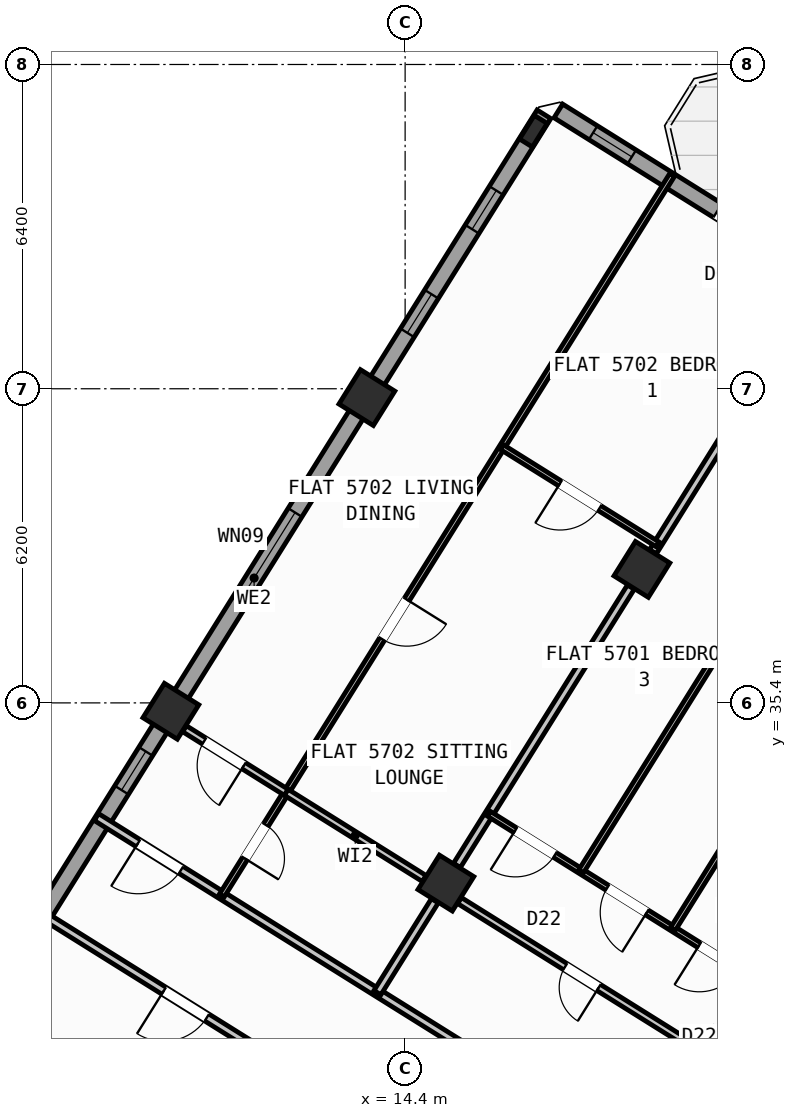
"""IFC4 building model, lengths in metres.
Left out: names, types, materials, properties, quantities, classifications, styles, units other than length and angle.
Written with IfcOpenShell. Run it as: python <this file> out.ifc"""

import sys

from ifc_helpers import new_model, si_unit, direction, frame, frame_2d, origin, origin_2d, place, context, subcontext, project, spatial, rectangle, hollow_rectangle, i_section, extrude, source, transform, mapped, element, fill, save


model = new_model("IFC4")
c1 = context("Model", 3, precision=1e-05, world=origin(), true_north=direction((0.0, 1.0)))
c2 = subcontext(c1, "Body", "Model", "MODEL_VIEW")
j1 = project(units=[si_unit("LENGTHUNIT", "METRE"), si_unit("PLANEANGLEUNIT", "RADIAN")], contexts=[c1])
p1 = place(None, origin())
s1 = spatial("IfcSite", under=j1, at=p1, CompositionType="ELEMENT")
p2 = place(p1, origin())
s2 = spatial("IfcBuilding", under=s1, at=p2, CompositionType="ELEMENT")
p3 = place(p2, frame((0.0, 0.0, 225.6)))
s3 = spatial("IfcBuildingStorey", under=s2, at=p3, CompositionType="ELEMENT", Elevation=225.6)
m1 = source(origin(), c2, "Body", "SweptSolid", [
    extrude(hollow_rectangle(XDim=0.8, YDim=0.8, WallThickness=0.032, at=origin_2d()), origin(), (0.0, 0.0, 1.0), 3.6),
])
for number, where, z_axis, x_axis in (
    (1, (20.632, 28.452, 0.0), (0.0, 0.0, 1.0), (-0.848, 0.53, 0.0)),
    (2, (19.073, 38.034, 0.0), (0.0, 0.0, 1.0), (-0.848, 0.53, 0.0)),
    (3, (15.205, 31.844, 0.0), (0.0, 0.0, 1.0), (-0.848, 0.53, 0.0)),
):
    element("IfcColumn", number, at=place(p3, frame(where, z_axis=z_axis, x_axis=x_axis)), inside=s3, PredefinedType="COLUMN", context=c2, shape_type="MappedRepresentation", body=[
        mapped(m1, transform((0.0, 0.0, 0.0), scale=1.0)),
    ])
m2 = source(origin(), c2, "Body", "SweptSolid", [
    extrude(i_section(OverallWidth=0.3, OverallDepth=0.55, WebThickness=0.015, FlangeThickness=0.029, at=origin_2d()), origin(), (0.0, 0.0, 1.0), 3.6),
])
p4 = place(p3, frame((16.931, 46.684, 0.0), z_axis=(0.0, 0.0, 1.0), x_axis=(-0.848048096156, 0.529919264233, 0.0)))
e4 = element("IfcColumn", 4, at=p4, inside=s3, PredefinedType="COLUMN", context=c2, shape_type="MappedRepresentation", body=[
    mapped(m2, transform((0.0, 0.0, 0.0), scale=1.0)),
])
for number, where, z_axis, x_axis in (
    (5, (13.646, 41.426, 0.0), (0.0, 0.0, 1.0), (-0.848, 0.53, 0.0)),
    (6, (9.777, 35.235, 0.0), (0.0, 0.0, 1.0), (-0.848, 0.53, 0.0)),
):
    element("IfcColumn", number, at=place(p3, frame(where, z_axis=z_axis, x_axis=x_axis)), inside=s3, PredefinedType="COLUMN", context=c2, shape_type="MappedRepresentation", body=[
        mapped(m1, transform((0.0, 0.0, 0.0), scale=1.0)),
    ])
p5 = place(p3, frame((5.7, 28.71, 0.0), z_axis=(0.0, 0.0, 1.0), x_axis=(0.529923711467, 0.8480453172, 0.0)))
e7 = element("IfcWall", 7, at=p5, inside=s3, PredefinedType="STANDARD", context=c2, shape_type="SweptSolid", body=[
    extrude(rectangle(XDim=21.587, YDim=0.32, at=frame_2d((10.794, 0.0))), origin(), (0.0, 0.0, 1.0), 2.825),
])
p6 = place(p5, frame((1.329, 0.0, 1.0)))
e8 = element("IfcOpeningElement", 8, at=p6, cuts=e7, PredefinedType="OPENING", context=c2, shape_type="SweptSolid", body=[
    extrude(rectangle(XDim=0.9, YDim=1.25, at=frame_2d((0.45, 0.625))), frame((0.0, 0.17, 0.0), z_axis=(0.0, -1.0, 0.0), x_axis=(1.0, 0.0, 0.0)), (0.0, 0.0, 1.0), 0.34),
])
p7 = place(p5, frame((5.859, 0.0, 1.0)))
e9 = element("IfcOpeningElement", 9, at=p7, cuts=e7, PredefinedType="OPENING", context=c2, shape_type="SweptSolid", body=[
    extrude(rectangle(XDim=0.9, YDim=1.25, at=frame_2d((0.45, 0.625))), frame((0.0, 0.17, 0.0), z_axis=(0.0, -1.0, 0.0), x_axis=(1.0, 0.0, 0.0)), (0.0, 0.0, 1.0), 0.34),
])
p8 = place(p5, frame((10.369, 0.0, 0.95)))
e10 = element("IfcOpeningElement", 10, at=p8, cuts=e7, PredefinedType="OPENING", context=c2, shape_type="SweptSolid", body=[
    extrude(rectangle(XDim=1.95, YDim=1.35, at=frame_2d((0.975, 0.675))), frame((0.0, 0.17, 0.0), z_axis=(0.0, -1.0, 0.0), x_axis=(1.0, 0.0, 0.0)), (0.0, 0.0, 1.0), 0.34),
])
p9 = place(p5, frame((16.5, 0.0, 1.0)))
e11 = element("IfcOpeningElement", 11, at=p9, cuts=e7, PredefinedType="OPENING", context=c2, shape_type="SweptSolid", body=[
    extrude(rectangle(XDim=0.9, YDim=1.25, at=frame_2d((0.45, 0.625))), frame((0.0, 0.17, 0.0), z_axis=(0.0, -1.0, 0.0), x_axis=(1.0, 0.0, 0.0)), (0.0, 0.0, 1.0), 0.34),
])
p10 = place(p5, frame((18.913, 0.0, 1.0)))
e12 = element("IfcOpeningElement", 12, at=p10, cuts=e7, PredefinedType="OPENING", context=c2, shape_type="SweptSolid", body=[
    extrude(rectangle(XDim=0.9, YDim=1.25, at=frame_2d((0.45, 0.625))), frame((0.0, 0.17, 0.0), z_axis=(0.0, -1.0, 0.0), x_axis=(1.0, 0.0, 0.0)), (0.0, 0.0, 1.0), 0.34),
])
p11 = place(p3, frame((17.424, 47.083, 0.0), z_axis=(0.0, 0.0, 1.0), x_axis=(0.848049927979, -0.529916332693, 0.0)))
e13 = element("IfcWall", 13, at=p11, inside=s3, PredefinedType="STANDARD", context=c2, shape_type="SweptSolid", body=[
    extrude(rectangle(XDim=29.223, YDim=0.32, at=frame_2d((14.612, 0.0))), origin(), (0.0, 0.0, 1.0), 3.35),
])
p12 = place(p11, frame((3.709, 0.0, 0.0)))
e14 = element("IfcOpeningElement", 14, at=p12, cuts=e13, PredefinedType="OPENING", context=c2, shape_type="SweptSolid", body=[
    extrude(rectangle(XDim=1.05, YDim=2.15, at=frame_2d((0.525, 1.075))), frame((0.0, 0.17, 0.0), z_axis=(0.0, -1.0, 0.0), x_axis=(1.0, 0.0, 0.0)), (0.0, 0.0, 1.0), 0.34),
])
p13 = place(p11, frame((0.809, 0.0, 1.0)))
e15 = element("IfcOpeningElement", 15, at=p13, cuts=e13, PredefinedType="OPENING", context=c2, shape_type="SweptSolid", body=[
    extrude(rectangle(XDim=0.9, YDim=1.25, at=frame_2d((0.45, 0.625))), frame((0.0, 0.17, 0.0), z_axis=(0.0, -1.0, 0.0), x_axis=(1.0, 0.0, 0.0)), (0.0, 0.0, 1.0), 0.34),
])
p14 = place(p11, frame((13.811, 0.0, 0.9)))
e16 = element("IfcOpeningElement", 16, at=p14, cuts=e13, PredefinedType="OPENING", context=c2, shape_type="SweptSolid", body=[
    extrude(rectangle(XDim=1.35, YDim=1.45, at=frame_2d((0.675, 0.725))), frame((0.0, 0.17, 0.0), z_axis=(0.0, -1.0, 0.0), x_axis=(1.0, 0.0, 0.0)), (0.0, 0.0, 1.0), 0.34),
])
p15 = place(p11, frame((17.254, 0.0, 1.0)))
e17 = element("IfcOpeningElement", 17, at=p15, cuts=e13, PredefinedType="OPENING", context=c2, shape_type="SweptSolid", body=[
    extrude(rectangle(XDim=0.9, YDim=1.25, at=frame_2d((0.45, 0.625))), frame((0.0, 0.17, 0.0), z_axis=(0.0, -1.0, 0.0), x_axis=(1.0, 0.0, 0.0)), (0.0, 0.0, 1.0), 0.34),
])
p16 = place(p11, frame((21.364, 0.0, 1.0)))
e18 = element("IfcOpeningElement", 18, at=p16, cuts=e13, PredefinedType="OPENING", context=c2, shape_type="SweptSolid", body=[
    extrude(rectangle(XDim=0.9, YDim=1.25, at=frame_2d((0.45, 0.625))), frame((0.0, 0.17, 0.0), z_axis=(0.0, -1.0, 0.0), x_axis=(1.0, 0.0, 0.0)), (0.0, 0.0, 1.0), 0.34),
])
p17 = place(p11, frame((26.003, 0.0, 1.0)))
e19 = element("IfcOpeningElement", 19, at=p17, cuts=e13, PredefinedType="OPENING", context=c2, shape_type="SweptSolid", body=[
    extrude(rectangle(XDim=0.9, YDim=1.25, at=frame_2d((0.45, 0.625))), frame((0.0, 0.17, 0.0), z_axis=(0.0, -1.0, 0.0), x_axis=(1.0, 0.0, 0.0)), (0.0, 0.0, 1.0), 0.34),
])
p18 = place(p11, frame((11.211, 0.0, 1.0)))
e20 = element("IfcOpeningElement", 20, at=p18, cuts=e13, PredefinedType="OPENING", context=c2, shape_type="SweptSolid", body=[
    extrude(rectangle(XDim=0.65, YDim=1.15, at=frame_2d((0.325, 0.575))), frame((0.0, 0.17, 0.0), z_axis=(0.0, -1.0, 0.0), x_axis=(1.0, 0.0, 0.0)), (0.0, 0.0, 1.0), 0.34),
])
p19 = place(p11, frame((9.079, 0.0, 1.0)))
e21 = element("IfcOpeningElement", 21, at=p19, cuts=e13, PredefinedType="OPENING", context=c2, shape_type="SweptSolid", body=[
    extrude(rectangle(XDim=0.65, YDim=1.15, at=frame_2d((0.325, 0.575))), frame((0.0, 0.17, 0.0), z_axis=(0.0, -1.0, 0.0), x_axis=(1.0, 0.0, 0.0)), (0.0, 0.0, 1.0), 0.34),
])
p20 = place(p11, frame((6.951, 0.0, 1.0)))
e22 = element("IfcOpeningElement", 22, at=p20, cuts=e13, PredefinedType="OPENING", context=c2, shape_type="SweptSolid", body=[
    extrude(rectangle(XDim=0.65, YDim=1.15, at=frame_2d((0.325, 0.575))), frame((0.0, 0.17, 0.0), z_axis=(0.0, -1.0, 0.0), x_axis=(1.0, 0.0, 0.0)), (0.0, 0.0, 1.0), 0.34),
])
p21 = place(p3, frame((22.495, 24.281, 0.0), z_axis=(0.0, 0.0, 1.0), x_axis=(-0.848052408131, 0.529912363569, 0.0)))
e23 = element("IfcWall", 23, at=p21, inside=s3, PredefinedType="PARTITIONING", context=c2, shape_type="SweptSolid", body=[
    extrude(rectangle(XDim=16.73, YDim=0.16, at=frame_2d((8.365, 0.0))), origin(), (0.0, 0.0, 1.0), 3.34),
])
p22 = place(p21, frame((1.385, 0.0, 0.0)))
e24 = element("IfcOpeningElement", 24, at=p22, cuts=e23, PredefinedType="OPENING", context=c2, shape_type="SweptSolid", body=[
    extrude(rectangle(XDim=1.0, YDim=2.1, at=frame_2d((0.5, 1.05))), frame((0.0, 0.09, 0.0), z_axis=(0.0, -1.0, 0.0), x_axis=(1.0, 0.0, 0.0)), (0.0, 0.0, 1.0), 0.18),
])
p23 = place(p21, frame((14.76, 0.0, 0.0)))
e25 = element("IfcOpeningElement", 25, at=p23, cuts=e23, PredefinedType="OPENING", context=c2, shape_type="SweptSolid", body=[
    extrude(rectangle(XDim=1.0, YDim=2.1, at=frame_2d((0.5, 1.05))), frame((0.0, 0.09, 0.0), z_axis=(0.0, -1.0, 0.0), x_axis=(1.0, 0.0, 0.0)), (0.0, 0.0, 1.0), 0.18),
])
p24 = place(p3, frame((21.329, 22.416, 0.0), z_axis=(0.0, 0.0, 1.0), x_axis=(-0.848052408131, 0.529912363569, 0.0)))
e26 = element("IfcWall", 26, at=p24, inside=s3, PredefinedType="PARTITIONING", context=c2, shape_type="SweptSolid", body=[
    extrude(rectangle(XDim=16.73, YDim=0.16, at=frame_2d((8.365, 0.0))), origin(), (0.0, 0.0, 1.0), 3.34),
])
p25 = place(p24, frame((1.505, 0.0, 0.0)))
e27 = element("IfcOpeningElement", 27, at=p25, cuts=e26, PredefinedType="OPENING", context=c2, shape_type="SweptSolid", body=[
    extrude(rectangle(XDim=1.0, YDim=2.1, at=frame_2d((0.5, 1.05))), frame((0.0, 0.09, 0.0), z_axis=(0.0, -1.0, 0.0), x_axis=(1.0, 0.0, 0.0)), (0.0, 0.0, 1.0), 0.18),
])
p26 = place(p24, frame((6.435, 0.0, 0.0)))
e28 = element("IfcOpeningElement", 28, at=p26, cuts=e26, PredefinedType="OPENING", context=c2, shape_type="SweptSolid", body=[
    extrude(rectangle(XDim=1.0, YDim=2.1, at=frame_2d((0.5, 1.05))), frame((0.0, 0.09, 0.0), z_axis=(0.0, -1.0, 0.0), x_axis=(1.0, 0.0, 0.0)), (0.0, 0.0, 1.0), 0.18),
])
p27 = place(p24, frame((12.784, 0.0, 0.0)))
e29 = element("IfcOpeningElement", 29, at=p27, cuts=e26, PredefinedType="OPENING", context=c2, shape_type="SweptSolid", body=[
    extrude(rectangle(XDim=1.0, YDim=2.1, at=frame_2d((0.5, 1.05))), frame((0.0, 0.09, 0.0), z_axis=(0.0, -1.0, 0.0), x_axis=(1.0, 0.0, 0.0)), (0.0, 0.0, 1.0), 0.18),
])
p28 = place(p3, frame((22.206, 43.049, 0.0), z_axis=(0.0, 0.0, 1.0), x_axis=(-0.529919150083, -0.848048167486, 0.0)))
e30 = element("IfcWall", 30, at=p28, inside=s3, PredefinedType="PARTITIONING", context=c2, shape_type="SweptSolid", body=[
    extrude(rectangle(XDim=5.501, YDim=0.16, at=frame_2d((2.75, 0.0))), origin(), (0.0, 0.0, 1.0), 2.825),
])
p29 = place(p3, frame((18.854, 37.685, 0.0), z_axis=(0.0, 0.0, 1.0), x_axis=(-0.529907440938, -0.848055484057, 0.0)))
e31 = element("IfcWall", 31, at=p29, inside=s3, PredefinedType="PARTITIONING", context=c2, shape_type="SweptSolid", body=[
    extrude(rectangle(XDim=6.476, YDim=0.16, at=frame_2d((3.238, 0.0))), origin(), (0.0, 0.0, 1.0), 2.825),
])
p30 = place(p3, frame((14.986, 31.494, 0.0), z_axis=(0.0, 0.0, 1.0), x_axis=(-0.52989628283, -0.848062456098, 0.0)))
e32 = element("IfcWall", 32, at=p30, inside=s3, PredefinedType="PARTITIONING", context=c2, shape_type="SweptSolid", body=[
    extrude(rectangle(XDim=2.138, YDim=0.16, at=frame_2d((1.069, 0.0))), origin(), (0.0, 0.0, 1.0), 2.825),
])
p31 = place(p3, frame((20.203, 28.543, 0.0), z_axis=(0.0, 0.0, 1.0), x_axis=(-0.848049955116, 0.529916289265, 0.0)))
e33 = element("IfcWall", 33, at=p31, inside=s3, PredefinedType="PLUMBINGWALL", context=c2, shape_type="SweptSolid", body=[
    extrude(rectangle(XDim=5.576, YDim=0.14, at=frame_2d((2.788, 0.0))), origin(), (0.0, 0.0, 1.0), 2.825),
])
p32 = place(p31, frame((2.338, 0.0, 0.0)))
e34 = element("IfcOpeningElement", 34, at=p32, cuts=e33, PredefinedType="OPENING", context=c2, shape_type="SweptSolid", body=[
    extrude(rectangle(XDim=0.78, YDim=2.05, at=frame_2d((0.39, 1.025))), frame((0.0, 0.08, 0.0), z_axis=(0.0, -1.0, 0.0), x_axis=(1.0, 0.0, 0.0)), (0.0, 0.0, 1.0), 0.16),
])
p33 = place(p3, frame((21.502, 29.807, 0.0), z_axis=(0.0, 0.0, 1.0), x_axis=(-0.848051709137, 0.529913482212, 0.0)))
e35 = element("IfcWall", 35, at=p33, inside=s3, PredefinedType="PARTITIONING", context=c2, shape_type="SweptSolid", body=[
    extrude(rectangle(XDim=6.42, YDim=0.11, at=frame_2d((3.21, 0.0))), origin(), (0.0, 0.0, 1.0), 3.34),
])
p34 = place(p33, frame((0.61, 0.0, 0.0)))
e36 = element("IfcOpeningElement", 36, at=p34, cuts=e35, PredefinedType="OPENING", context=c2, shape_type="SweptSolid", body=[
    extrude(rectangle(XDim=0.92, YDim=2.08, at=frame_2d((0.46, 1.04))), frame((0.0, 0.065, 0.0), z_axis=(0.0, -1.0, 0.0), x_axis=(1.0, 0.0, 0.0)), (0.0, 0.0, 1.0), 0.13),
])
p35 = place(p33, frame((2.75, 0.0, 0.0)))
e37 = element("IfcOpeningElement", 37, at=p35, cuts=e35, PredefinedType="OPENING", context=c2, shape_type="SweptSolid", body=[
    extrude(rectangle(XDim=0.92, YDim=2.08, at=frame_2d((0.46, 1.04))), frame((0.0, 0.065, 0.0), z_axis=(0.0, -1.0, 0.0), x_axis=(1.0, 0.0, 0.0)), (0.0, 0.0, 1.0), 0.13),
])
p36 = place(p33, frame((4.89, 0.0, 0.0)))
e38 = element("IfcOpeningElement", 38, at=p36, cuts=e35, PredefinedType="OPENING", context=c2, shape_type="SweptSolid", body=[
    extrude(rectangle(XDim=0.92, YDim=2.08, at=frame_2d((0.46, 1.04))), frame((0.0, 0.065, 0.0), z_axis=(0.0, -1.0, 0.0), x_axis=(1.0, 0.0, 0.0)), (0.0, 0.0, 1.0), 0.13),
])
p37 = place(p3, frame((26.37, 41.635, 0.0), z_axis=(0.0, 0.0, 1.0), x_axis=(-0.529925845384, -0.848043983761, 0.0)))
e39 = element("IfcWall", 39, at=p37, inside=s3, PredefinedType="PARTITIONING", context=c2, shape_type="SweptSolid", body=[
    extrude(rectangle(XDim=12.61, YDim=0.11, at=frame_2d((6.305, 0.0))), origin(), (0.0, 0.0, 1.0), 2.995),
])
p38 = place(p3, frame((24.555, 42.769, 0.0), z_axis=(0.0, 0.0, 1.0), x_axis=(-0.529911921261, -0.848052684511, 0.0)))
e40 = element("IfcWall", 40, at=p38, inside=s3, PredefinedType="PARTITIONING", context=c2, shape_type="SweptSolid", body=[
    extrude(rectangle(XDim=12.61, YDim=0.11, at=frame_2d((6.305, 0.0))), origin(), (0.0, 0.0, 1.0), 2.995),
])
p39 = place(p3, frame((19.67, 45.821, 0.0), z_axis=(0.0, 0.0, 1.0), x_axis=(-0.529920421309, -0.848047373134, 0.0)))
e41 = element("IfcWall", 41, at=p39, inside=s3, PredefinedType="PARTITIONING", context=c2, shape_type="SweptSolid", body=[
    extrude(rectangle(XDim=16.77, YDim=0.11, at=frame_2d((8.385, 0.0))), origin(), (0.0, 0.0, 1.0), 3.34),
])
p40 = place(p39, frame((15.13, 0.0, 0.0)))
e42 = element("IfcOpeningElement", 42, at=p40, cuts=e41, PredefinedType="OPENING", context=c2, shape_type="SweptSolid", body=[
    extrude(rectangle(XDim=0.78, YDim=2.05, at=frame_2d((0.39, 1.025))), frame((0.0, 0.065, 0.0), z_axis=(0.0, -1.0, 0.0), x_axis=(1.0, 0.0, 0.0)), (0.0, 0.0, 1.0), 0.13),
])
p41 = place(p39, frame((9.884, 0.0, 0.0)))
e43 = element("IfcOpeningElement", 43, at=p41, cuts=e41, PredefinedType="OPENING", context=c2, shape_type="SweptSolid", body=[
    extrude(rectangle(XDim=0.92, YDim=2.08, at=frame_2d((0.46, 1.04))), frame((0.0, 0.065, 0.0), z_axis=(0.0, -1.0, 0.0), x_axis=(1.0, 0.0, 0.0)), (0.0, 0.0, 1.0), 0.13),
])
p42 = place(p3, frame((12.055, 33.635, 0.0), z_axis=(0.0, 0.0, 1.0), x_axis=(-0.848102546264, 0.529832115883, 0.0)))
e44 = element("IfcWall", 44, at=p42, inside=s3, PredefinedType="PLUMBINGWALL", context=c2, shape_type="SweptSolid", body=[
    extrude(rectangle(XDim=2.368, YDim=0.14, at=frame_2d((1.184, 0.0))), origin(), (0.0, 0.0, 1.0), 2.825),
])
p43 = place(p42, frame((0.99, 0.0, 0.0)))
e45 = element("IfcOpeningElement", 45, at=p43, cuts=e44, PredefinedType="OPENING", context=c2, shape_type="SweptSolid", body=[
    extrude(rectangle(XDim=0.92, YDim=2.08, at=frame_2d((0.46, 1.04))), frame((0.0, 0.08, 0.0), z_axis=(0.0, -1.0, 0.0), x_axis=(1.0, 0.0, 0.0)), (0.0, 0.0, 1.0), 0.16),
])
p44 = place(p3, frame((14.776, 31.935, 0.0), z_axis=(0.0, 0.0, 1.0), x_axis=(-0.848011130036, 0.529978417802, 0.0)))
e46 = element("IfcWall", 46, at=p44, inside=s3, PredefinedType="PLUMBINGWALL", context=c2, shape_type="SweptSolid", body=[
    extrude(rectangle(XDim=3.208, YDim=0.14, at=frame_2d((1.604, 0.0))), origin(), (0.0, 0.0, 1.0), 2.825),
])
p45 = place(p3, frame((19.382, 38.529, 0.0), z_axis=(0.0, 0.0, 1.0), x_axis=(-0.848051346257, 0.52991406295, 0.0)))
e47 = element("IfcWall", 47, at=p45, inside=s3, PredefinedType="PARTITIONING", context=c2, shape_type="SweptSolid", body=[
    extrude(rectangle(XDim=3.62, YDim=0.11, at=frame_2d((1.81, 0.0))), origin(), (0.0, 0.0, 1.0), 3.34),
])
p46 = place(p45, frame((1.35, 0.0, 0.0)))
e48 = element("IfcOpeningElement", 48, at=p46, cuts=e47, PredefinedType="OPENING", context=c2, shape_type="SweptSolid", body=[
    extrude(rectangle(XDim=0.92, YDim=2.08, at=frame_2d((0.46, 1.04))), frame((0.0, 0.065, 0.0), z_axis=(0.0, -1.0, 0.0), x_axis=(1.0, 0.0, 0.0)), (0.0, 0.0, 1.0), 0.13),
])
m3 = source(origin(), c2, "Body", "SweptSolid", [
    extrude(rectangle(XDim=1.05, YDim=2.15, at=frame_2d((0.525, 1.075))), frame((0.0, 0.025, 0.0), z_axis=(0.0, -1.0, 0.0), x_axis=(1.0, 0.0, 0.0)), (0.0, 0.0, 1.0), 0.05),
])
p47 = place(p12, origin())
e49 = element("IfcDoor", 49, at=p47, inside=s3, OperationType="SINGLE_SWING_RIGHT", PredefinedType="DOOR", context=c2, shape_type="MappedRepresentation", body=[
    mapped(m3, transform((0.0, 0.0, 0.0), scale=1.0)),
])
fill(e14, e49)
m4 = source(origin(), c2, "Body", "SweptSolid", [
    extrude(rectangle(XDim=0.9, YDim=1.25, at=frame_2d((0.45, 0.625))), frame((0.0, 0.03, 0.0), z_axis=(0.0, -1.0, 0.0), x_axis=(1.0, 0.0, 0.0)), (0.0, 0.0, 1.0), 0.06),
])
p48 = place(p7, origin())
e50 = element("IfcWindow", 50, at=p48, inside=s3, PartitioningType="SINGLE_PANEL", PredefinedType="WINDOW", context=c2, shape_type="MappedRepresentation", body=[
    mapped(m4, transform((0.0, 0.0, 0.0), scale=1.0)),
])
fill(e9, e50)
m5 = source(origin(), c2, "Body", "SweptSolid", [
    extrude(rectangle(XDim=1.95, YDim=1.35, at=frame_2d((0.975, 0.675))), frame((0.0, 0.03, 0.0), z_axis=(0.0, -1.0, 0.0), x_axis=(1.0, 0.0, 0.0)), (0.0, 0.0, 1.0), 0.06),
])
p49 = place(p8, origin())
e51 = element("IfcWindow", 51, at=p49, inside=s3, PartitioningType="SINGLE_PANEL", PredefinedType="WINDOW", context=c2, shape_type="MappedRepresentation", body=[
    mapped(m5, transform((0.0, 0.0, 0.0), scale=1.0)),
])
fill(e10, e51)
p50 = place(p9, origin())
e52 = element("IfcWindow", 52, at=p50, inside=s3, PartitioningType="SINGLE_PANEL", PredefinedType="WINDOW", context=c2, shape_type="MappedRepresentation", body=[
    mapped(m4, transform((0.0, 0.0, 0.0), scale=1.0)),
])
fill(e11, e52)
p51 = place(p10, origin())
e53 = element("IfcWindow", 53, at=p51, inside=s3, PartitioningType="SINGLE_PANEL", PredefinedType="WINDOW", context=c2, shape_type="MappedRepresentation", body=[
    mapped(m4, transform((0.0, 0.0, 0.0), scale=1.0)),
])
fill(e12, e53)
p52 = place(p13, origin())
e54 = element("IfcWindow", 54, at=p52, inside=s3, PartitioningType="SINGLE_PANEL", PredefinedType="WINDOW", context=c2, shape_type="MappedRepresentation", body=[
    mapped(m4, transform((0.0, 0.0, 0.0), scale=1.0)),
])
fill(e15, e54)
m6 = source(origin(), c2, "Body", "SweptSolid", [
    extrude(rectangle(XDim=1.0, YDim=2.1, at=frame_2d((0.5, 1.05))), frame((0.0, 0.025, 0.0), z_axis=(0.0, -1.0, 0.0), x_axis=(1.0, 0.0, 0.0)), (0.0, 0.0, 1.0), 0.05),
])
p53 = place(p27, origin())
e55 = element("IfcDoor", 55, at=p53, inside=s3, OperationType="SINGLE_SWING_RIGHT", PredefinedType="DOOR", context=c2, shape_type="MappedRepresentation", body=[
    mapped(m6, transform((0.0, 0.0, 0.0), scale=1.0)),
])
fill(e29, e55)
m7 = source(origin(), c2, "Body", "SweptSolid", [
    extrude(rectangle(XDim=0.78, YDim=2.05, at=frame_2d((0.39, 1.025))), frame((0.0, 0.025, 0.0), z_axis=(0.0, -1.0, 0.0), x_axis=(1.0, 0.0, 0.0)), (0.0, 0.0, 1.0), 0.05),
])
p54 = place(p32, origin())
e56 = element("IfcDoor", 56, at=p54, inside=s3, OperationType="SINGLE_SWING_LEFT", PredefinedType="DOOR", context=c2, shape_type="MappedRepresentation", body=[
    mapped(m7, transform((0.0, 0.0, 0.0), scale=1.0)),
])
fill(e34, e56)
m8 = source(origin(), c2, "Body", "SweptSolid", [
    extrude(rectangle(XDim=0.92, YDim=2.08, at=frame_2d((0.46, 1.04))), frame((0.0, 0.025, 0.0), z_axis=(0.0, -1.0, 0.0), x_axis=(1.0, 0.0, 0.0)), (0.0, 0.0, 1.0), 0.05),
])
p55 = place(p34, origin())
e57 = element("IfcDoor", 57, at=p55, inside=s3, OperationType="SINGLE_SWING_RIGHT", PredefinedType="DOOR", context=c2, shape_type="MappedRepresentation", body=[
    mapped(m8, transform((0.0, 0.0, 0.0), scale=1.0)),
])
fill(e36, e57)
p56 = place(p35, origin())
e58 = element("IfcDoor", 58, at=p56, inside=s3, OperationType="SINGLE_SWING_LEFT", PredefinedType="DOOR", context=c2, shape_type="MappedRepresentation", body=[
    mapped(m8, transform((0.0, 0.0, 0.0), scale=1.0)),
])
fill(e37, e58)
p57 = place(p36, origin())
e59 = element("IfcDoor", 59, at=p57, inside=s3, OperationType="SINGLE_SWING_RIGHT", PredefinedType="DOOR", context=c2, shape_type="MappedRepresentation", body=[
    mapped(m8, transform((0.0, 0.0, 0.0), scale=1.0)),
])
fill(e38, e59)
p58 = place(p23, origin())
e60 = element("IfcDoor", 60, at=p58, inside=s3, OperationType="SINGLE_SWING_RIGHT", PredefinedType="DOOR", context=c2, shape_type="MappedRepresentation", body=[
    mapped(m6, transform((0.0, 0.0, 0.0), scale=1.0)),
])
fill(e25, e60)
p59 = place(p43, origin())
e61 = element("IfcDoor", 61, at=p59, inside=s3, OperationType="SINGLE_SWING_LEFT", PredefinedType="DOOR", context=c2, shape_type="MappedRepresentation", body=[
    mapped(m8, transform((0.0, 0.0, 0.0), scale=1.0)),
])
fill(e45, e61)
p60 = place(p40, origin())
e62 = element("IfcDoor", 62, at=p60, inside=s3, OperationType="SINGLE_SWING_RIGHT", PredefinedType="DOOR", context=c2, shape_type="MappedRepresentation", body=[
    mapped(m7, transform((0.0, 0.0, 0.0), scale=1.0)),
])
fill(e42, e62)
p61 = place(p41, origin())
e63 = element("IfcDoor", 63, at=p61, inside=s3, OperationType="SINGLE_SWING_LEFT", PredefinedType="DOOR", context=c2, shape_type="MappedRepresentation", body=[
    mapped(m8, transform((0.0, 0.0, 0.0), scale=1.0)),
])
fill(e43, e63)
p62 = place(p46, origin())
e64 = element("IfcDoor", 64, at=p62, inside=s3, OperationType="SINGLE_SWING_RIGHT", PredefinedType="DOOR", context=c2, shape_type="MappedRepresentation", body=[
    mapped(m8, transform((0.0, 0.0, 0.0), scale=1.0)),
])
fill(e48, e64)
save(model, sys.argv[1])
